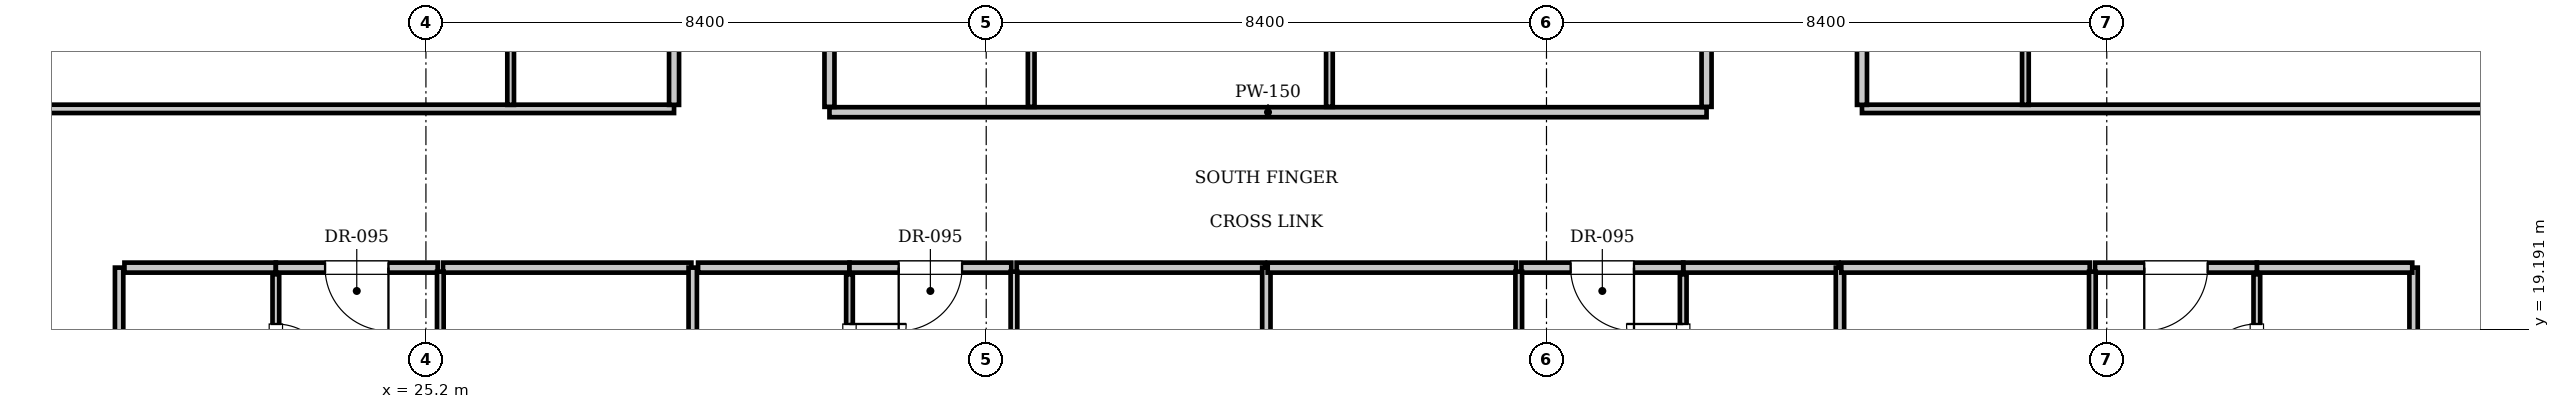
"""IFC4 building model, lengths in metres.
Left out: names, types, materials, properties, quantities, classifications, styles, units other than length and angle.
Written with IfcOpenShell. Run it as: python <this file> out.ifc"""

import sys

from ifc_helpers import new_model, si_unit, direction, frame, frame_2d, origin, place, context, subcontext, project, spatial, rectangle, extrude, element, fill, save


model = new_model("IFC4")
c1 = context("Model", 3, precision=1e-05, world=origin(), true_north=direction((0.0, 1.0)))
c2 = subcontext(c1, "Body", "Model", "MODEL_VIEW")
j1 = project(units=[si_unit("LENGTHUNIT", "METRE"), si_unit("PLANEANGLEUNIT", "RADIAN")], contexts=[c1])
p1 = place(None, origin())
s1 = spatial("IfcSite", under=j1, at=p1, CompositionType="ELEMENT")
p2 = place(p1, origin())
s2 = spatial("IfcBuilding", under=s1, at=p2, CompositionType="ELEMENT")
p3 = place(p2, frame((0.0, 0.0, 250.95)))
s3 = spatial("IfcBuildingStorey", under=s2, at=p3, CompositionType="ELEMENT", Elevation=250.95)
p4 = place(p3, frame((31.25, 22.45, 0.0), z_axis=(0.0, 0.0, 1.0), x_axis=(1.0, 0.0, 0.0)))
e1 = element("IfcWall", 1, at=p4, inside=s3, PredefinedType="PARTITIONING", context=c2, shape_type="SweptSolid", body=[
    extrude(rectangle(XDim=13.15, YDim=0.15, at=frame_2d((6.575, 0.0))), origin(), (0.0, 0.0, 1.0), 3.61),
])
for number, where, z_axis, x_axis in (
    (2, (31.25, 22.53, 0.0), (0.0, 0.0, 1.0), (0.0, 1.0, 0.0)),
    (3, (44.4, 22.53, 0.0), (0.0, 0.0, 1.0), (0.0, 1.0, 0.0)),
):
    element("IfcWall", number, at=place(p3, frame(where, z_axis=z_axis, x_axis=x_axis)), inside=s3, PredefinedType="PARTITIONING", context=c2, shape_type="SweptSolid", body=[
        extrude(rectangle(XDim=8.89, YDim=0.15, at=frame_2d((4.445, 0.0))), origin(), (0.0, 0.0, 1.0), 3.61),
    ])
for number, where, z_axis, x_axis in (
    (4, (34.274, 22.53, 0.0), (0.0, 0.0, 1.0), (0.0, 1.0, 0.0)),
    (5, (38.746, 22.53, 0.0), (0.0, 0.0, 1.0), (0.0, 1.0, 0.0)),
):
    element("IfcWall", number, at=place(p3, frame(where, z_axis=z_axis, x_axis=x_axis)), inside=s3, PredefinedType="PARTITIONING", context=c2, shape_type="SweptSolid", body=[
        extrude(rectangle(XDim=8.89, YDim=0.1, at=frame_2d((4.445, 0.0))), origin(), (0.0, 0.0, 1.0), 3.61),
    ])
for number, where, z_axis, x_axis in (
    (6, (20.6, 14.4, 0.0), (0.0, 0.0, 1.0), (0.0, 1.0, 0.0)),
    (7, (55.0, 14.4, 0.0), (0.0, 0.0, 1.0), (0.0, 1.0, 0.0)),
):
    element("IfcWall", number, at=place(p3, frame(where, z_axis=z_axis, x_axis=x_axis)), inside=s3, PredefinedType="PARTITIONING", context=c2, shape_type="SweptSolid", body=[
        extrude(rectangle(XDim=5.72, YDim=0.125, at=frame_2d((2.86, 0.0))), origin(), (0.0, 0.0, 1.0), 3.61),
    ])
p5 = place(p3, frame((20.68, 20.12, 0.0), z_axis=(0.0, 0.0, 1.0), x_axis=(1.0, 0.0, 0.0)))
e8 = element("IfcWall", 8, at=p5, inside=s3, PredefinedType="PARTITIONING", context=c2, shape_type="SweptSolid", body=[
    extrude(rectangle(XDim=2.27, YDim=0.15, at=frame_2d((1.135, 0.0))), origin(), (0.0, 0.0, 1.0), 3.61),
])
p6 = place(p3, frame((22.95, 17.68, 0.0), z_axis=(0.0, 0.0, 1.0), x_axis=(0.0, 1.0, 0.0)))
e9 = element("IfcWall", 9, at=p6, inside=s3, PredefinedType="PARTITIONING", context=c2, shape_type="SweptSolid", body=[
    extrude(rectangle(XDim=2.34, YDim=0.1, at=frame_2d((1.17, 0.0))), origin(), (0.0, 0.0, 1.0), 3.61),
])
p7 = place(p6, frame((0.745, 0.0, 0.0)))
e10 = element("IfcOpeningElement", 10, at=p7, cuts=e9, PredefinedType="OPENING", context=c2, shape_type="SweptSolid", body=[
    extrude(rectangle(XDim=0.85, YDim=2.1, at=frame_2d((0.425, 1.05))), frame((0.0, 0.06, 0.0), z_axis=(0.0, -1.0, 0.0), x_axis=(1.0, 0.0, 0.0)), (0.0, 0.0, 1.0), 0.12),
])
p8 = place(p3, frame((22.95, 20.12, 0.0), z_axis=(0.0, 0.0, 1.0), x_axis=(1.0, 0.0, 0.0)))
e11 = element("IfcWall", 11, at=p8, inside=s3, PredefinedType="PARTITIONING", context=c2, shape_type="SweptSolid", body=[
    extrude(rectangle(XDim=2.426, YDim=0.15, at=frame_2d((1.213, 0.0))), origin(), (0.0, 0.0, 1.0), 3.61),
])
p9 = place(p8, frame((0.738, 0.0, 0.0)))
e12 = element("IfcOpeningElement", 12, at=p9, cuts=e11, PredefinedType="OPENING", context=c2, shape_type="SweptSolid", body=[
    extrude(rectangle(XDim=0.95, YDim=2.15, at=frame_2d((0.475, 1.075))), frame((0.0, 0.085, 0.0), z_axis=(0.0, -1.0, 0.0), x_axis=(1.0, 0.0, 0.0)), (0.0, 0.0, 1.0), 0.17),
])
p10 = place(p3, frame((25.456, 20.12, 0.0), z_axis=(0.0, 0.0, 1.0), x_axis=(1.0, 0.0, 0.0)))
e13 = element("IfcWall", 13, at=p10, inside=s3, PredefinedType="PARTITIONING", context=c2, shape_type="SweptSolid", body=[
    extrude(rectangle(XDim=3.724, YDim=0.15, at=frame_2d((1.862, 0.0))), origin(), (0.0, 0.0, 1.0), 3.61),
])
p11 = place(p3, frame((25.416, 9.23, 0.0), z_axis=(0.0, 0.0, 1.0), x_axis=(0.0, 1.0, 0.0)))
e14 = element("IfcWall", 14, at=p11, inside=s3, PredefinedType="PARTITIONING", context=c2, shape_type="SweptSolid", body=[
    extrude(rectangle(XDim=10.83, YDim=0.1, at=frame_2d((5.415, 0.0))), origin(), (0.0, 0.0, 1.0), 3.61),
])
p12 = place(p11, frame((1.6, 0.0, 0.0)))
e15 = element("IfcOpeningElement", 15, at=p12, cuts=e14, PredefinedType="OPENING", context=c2, shape_type="SweptSolid", body=[
    extrude(rectangle(XDim=0.9, YDim=2.1, at=frame_2d((0.45, 1.05))), frame((0.0, 0.06, 0.0), z_axis=(0.0, -1.0, 0.0), x_axis=(1.0, 0.0, 0.0)), (0.0, 0.0, 1.0), 0.12),
])
p13 = place(p3, frame((29.2, 9.3, 0.0), z_axis=(0.0, 0.0, 1.0), x_axis=(0.0, 1.0, 0.0)))
e16 = element("IfcWall", 16, at=p13, inside=s3, PredefinedType="PARTITIONING", context=c2, shape_type="SweptSolid", body=[
    extrude(rectangle(XDim=10.82, YDim=0.125, at=frame_2d((5.41, 0.0))), origin(), (0.0, 0.0, 1.0), 3.61),
])
p14 = place(p3, frame((29.28, 20.12, 0.0), z_axis=(0.0, 0.0, 1.0), x_axis=(1.0, 0.0, 0.0)))
e17 = element("IfcWall", 17, at=p14, inside=s3, PredefinedType="PARTITIONING", context=c2, shape_type="SweptSolid", body=[
    extrude(rectangle(XDim=2.27, YDim=0.15, at=frame_2d((1.135, 0.0))), origin(), (0.0, 0.0, 1.0), 3.61),
])
p15 = place(p3, frame((31.55, 17.68, 0.0), z_axis=(0.0, 0.0, 1.0), x_axis=(0.0, 1.0, 0.0)))
e18 = element("IfcWall", 18, at=p15, inside=s3, PredefinedType="PARTITIONING", context=c2, shape_type="SweptSolid", body=[
    extrude(rectangle(XDim=2.34, YDim=0.1, at=frame_2d((1.17, 0.0))), origin(), (0.0, 0.0, 1.0), 3.61),
])
p16 = place(p15, frame((0.745, 0.0, 0.0)))
e19 = element("IfcOpeningElement", 19, at=p16, cuts=e18, PredefinedType="OPENING", context=c2, shape_type="SweptSolid", body=[
    extrude(rectangle(XDim=0.85, YDim=2.1, at=frame_2d((0.425, 1.05))), frame((0.0, 0.06, 0.0), z_axis=(0.0, -1.0, 0.0), x_axis=(1.0, 0.0, 0.0)), (0.0, 0.0, 1.0), 0.12),
])
p17 = place(p3, frame((31.55, 20.12, 0.0), z_axis=(0.0, 0.0, 1.0), x_axis=(1.0, 0.0, 0.0)))
e20 = element("IfcWall", 20, at=p17, inside=s3, PredefinedType="PARTITIONING", context=c2, shape_type="SweptSolid", body=[
    extrude(rectangle(XDim=2.426, YDim=0.15, at=frame_2d((1.213, 0.0))), origin(), (0.0, 0.0, 1.0), 3.61),
])
p18 = place(p17, frame((0.738, 0.0, 0.0)))
e21 = element("IfcOpeningElement", 21, at=p18, cuts=e20, PredefinedType="OPENING", context=c2, shape_type="SweptSolid", body=[
    extrude(rectangle(XDim=0.95, YDim=2.15, at=frame_2d((0.475, 1.075))), frame((0.0, 0.085, 0.0), z_axis=(0.0, -1.0, 0.0), x_axis=(1.0, 0.0, 0.0)), (0.0, 0.0, 1.0), 0.17),
])
p19 = place(p3, frame((34.056, 20.12, 0.0), z_axis=(0.0, 0.0, 1.0), x_axis=(1.0, 0.0, 0.0)))
e22 = element("IfcWall", 22, at=p19, inside=s3, PredefinedType="PARTITIONING", context=c2, shape_type="SweptSolid", body=[
    extrude(rectangle(XDim=3.724, YDim=0.15, at=frame_2d((1.862, 0.0))), origin(), (0.0, 0.0, 1.0), 3.61),
])
p20 = place(p3, frame((34.016, 9.23, 0.0), z_axis=(0.0, 0.0, 1.0), x_axis=(0.0, 1.0, 0.0)))
e23 = element("IfcWall", 23, at=p20, inside=s3, PredefinedType="PARTITIONING", context=c2, shape_type="SweptSolid", body=[
    extrude(rectangle(XDim=10.83, YDim=0.1, at=frame_2d((5.415, 0.0))), origin(), (0.0, 0.0, 1.0), 3.61),
])
p21 = place(p20, frame((1.6, 0.0, 0.0)))
e24 = element("IfcOpeningElement", 24, at=p21, cuts=e23, PredefinedType="OPENING", context=c2, shape_type="SweptSolid", body=[
    extrude(rectangle(XDim=0.9, YDim=2.1, at=frame_2d((0.45, 1.05))), frame((0.0, 0.06, 0.0), z_axis=(0.0, -1.0, 0.0), x_axis=(1.0, 0.0, 0.0)), (0.0, 0.0, 1.0), 0.12),
])
p22 = place(p3, frame((37.8, 9.3, 0.0), z_axis=(0.0, 0.0, 1.0), x_axis=(0.0, 1.0, 0.0)))
e25 = element("IfcWall", 25, at=p22, inside=s3, PredefinedType="PARTITIONING", context=c2, shape_type="SweptSolid", body=[
    extrude(rectangle(XDim=10.82, YDim=0.125, at=frame_2d((5.41, 0.0))), origin(), (0.0, 0.0, 1.0), 3.352),
])
p23 = place(p3, frame((44.05, 20.12, 0.0), z_axis=(0.0, 0.0, 1.0), x_axis=(1.0, 0.0, 0.0)))
e26 = element("IfcWall", 26, at=p23, inside=s3, PredefinedType="PARTITIONING", context=c2, shape_type="SweptSolid", body=[
    extrude(rectangle(XDim=2.33, YDim=0.15, at=frame_2d((1.165, 0.0))), origin(), (0.0, 0.0, 1.0), 3.61),
])
p24 = place(p3, frame((44.05, 17.68, 0.0), z_axis=(0.0, 0.0, 1.0), x_axis=(0.0, 1.0, 0.0)))
e27 = element("IfcWall", 27, at=p24, inside=s3, PredefinedType="PARTITIONING", context=c2, shape_type="SweptSolid", body=[
    extrude(rectangle(XDim=2.34, YDim=0.1, at=frame_2d((1.17, 0.0))), origin(), (0.0, 0.0, 1.0), 3.61),
])
p25 = place(p24, frame((0.745, 0.0, 0.0)))
e28 = element("IfcOpeningElement", 28, at=p25, cuts=e27, PredefinedType="OPENING", context=c2, shape_type="SweptSolid", body=[
    extrude(rectangle(XDim=0.85, YDim=2.1, at=frame_2d((0.425, 1.05))), frame((0.0, 0.06, 0.0), z_axis=(0.0, -1.0, 0.0), x_axis=(1.0, 0.0, 0.0)), (0.0, 0.0, 1.0), 0.12),
])
p26 = place(p3, frame((37.82, 20.12, 0.0), z_axis=(0.0, 0.0, 1.0), x_axis=(1.0, 0.0, 0.0)))
e29 = element("IfcWall", 29, at=p26, inside=s3, PredefinedType="PARTITIONING", context=c2, shape_type="SweptSolid", body=[
    extrude(rectangle(XDim=3.724, YDim=0.15, at=frame_2d((1.862, 0.0))), origin(), (0.0, 0.0, 1.0), 3.61),
])
p27 = place(p3, frame((41.624, 20.12, 0.0), z_axis=(0.0, 0.0, 1.0), x_axis=(1.0, 0.0, 0.0)))
e30 = element("IfcWall", 30, at=p27, inside=s3, PredefinedType="PARTITIONING", context=c2, shape_type="SweptSolid", body=[
    extrude(rectangle(XDim=2.426, YDim=0.15, at=frame_2d((1.213, 0.0))), origin(), (0.0, 0.0, 1.0), 3.61),
])
p28 = place(p27, frame((0.738, 0.0, 0.0)))
e31 = element("IfcOpeningElement", 31, at=p28, cuts=e30, PredefinedType="OPENING", context=c2, shape_type="SweptSolid", body=[
    extrude(rectangle(XDim=0.95, YDim=2.15, at=frame_2d((0.475, 1.075))), frame((0.0, 0.085, 0.0), z_axis=(0.0, -1.0, 0.0), x_axis=(1.0, 0.0, 0.0)), (0.0, 0.0, 1.0), 0.17),
])
p29 = place(p3, frame((41.584, 9.23, 0.0), z_axis=(0.0, 0.0, 1.0), x_axis=(0.0, 1.0, 0.0)))
e32 = element("IfcWall", 32, at=p29, inside=s3, PredefinedType="PARTITIONING", context=c2, shape_type="SweptSolid", body=[
    extrude(rectangle(XDim=10.83, YDim=0.1, at=frame_2d((5.415, 0.0))), origin(), (0.0, 0.0, 1.0), 3.61),
])
p30 = place(p29, frame((1.6, 0.0, 0.0)))
e33 = element("IfcOpeningElement", 33, at=p30, cuts=e32, PredefinedType="OPENING", context=c2, shape_type="SweptSolid", body=[
    extrude(rectangle(XDim=0.9, YDim=2.1, at=frame_2d((0.45, 1.05))), frame((0.0, 0.06, 0.0), z_axis=(0.0, -1.0, 0.0), x_axis=(1.0, 0.0, 0.0)), (0.0, 0.0, 1.0), 0.12),
])
p31 = place(p3, frame((46.4, 9.3, 0.0), z_axis=(0.0, 0.0, 1.0), x_axis=(0.0, 1.0, 0.0)))
e34 = element("IfcWall", 34, at=p31, inside=s3, PredefinedType="PARTITIONING", context=c2, shape_type="SweptSolid", body=[
    extrude(rectangle(XDim=10.82, YDim=0.125, at=frame_2d((5.41, 0.0))), origin(), (0.0, 0.0, 1.0), 3.61),
])
p32 = place(p3, frame((52.65, 20.12, 0.0), z_axis=(0.0, 0.0, 1.0), x_axis=(1.0, 0.0, 0.0)))
e35 = element("IfcWall", 35, at=p32, inside=s3, PredefinedType="PARTITIONING", context=c2, shape_type="SweptSolid", body=[
    extrude(rectangle(XDim=2.33, YDim=0.15, at=frame_2d((1.165, 0.0))), origin(), (0.0, 0.0, 1.0), 3.61),
])
p33 = place(p3, frame((52.65, 17.68, 0.0), z_axis=(0.0, 0.0, 1.0), x_axis=(0.0, 1.0, 0.0)))
e36 = element("IfcWall", 36, at=p33, inside=s3, PredefinedType="PARTITIONING", context=c2, shape_type="SweptSolid", body=[
    extrude(rectangle(XDim=2.34, YDim=0.1, at=frame_2d((1.17, 0.0))), origin(), (0.0, 0.0, 1.0), 3.61),
])
p34 = place(p33, frame((0.745, 0.0, 0.0)))
e37 = element("IfcOpeningElement", 37, at=p34, cuts=e36, PredefinedType="OPENING", context=c2, shape_type="SweptSolid", body=[
    extrude(rectangle(XDim=0.85, YDim=2.1, at=frame_2d((0.425, 1.05))), frame((0.0, 0.06, 0.0), z_axis=(0.0, -1.0, 0.0), x_axis=(1.0, 0.0, 0.0)), (0.0, 0.0, 1.0), 0.12),
])
p35 = place(p3, frame((46.42, 20.12, 0.0), z_axis=(0.0, 0.0, 1.0), x_axis=(1.0, 0.0, 0.0)))
e38 = element("IfcWall", 38, at=p35, inside=s3, PredefinedType="PARTITIONING", context=c2, shape_type="SweptSolid", body=[
    extrude(rectangle(XDim=3.724, YDim=0.15, at=frame_2d((1.862, 0.0))), origin(), (0.0, 0.0, 1.0), 3.61),
])
p36 = place(p3, frame((50.224, 20.12, 0.0), z_axis=(0.0, 0.0, 1.0), x_axis=(1.0, 0.0, 0.0)))
e39 = element("IfcWall", 39, at=p36, inside=s3, PredefinedType="PARTITIONING", context=c2, shape_type="SweptSolid", body=[
    extrude(rectangle(XDim=2.426, YDim=0.15, at=frame_2d((1.213, 0.0))), origin(), (0.0, 0.0, 1.0), 3.61),
])
p37 = place(p36, frame((0.738, 0.0, 0.0)))
e40 = element("IfcOpeningElement", 40, at=p37, cuts=e39, PredefinedType="OPENING", context=c2, shape_type="SweptSolid", body=[
    extrude(rectangle(XDim=0.95, YDim=2.15, at=frame_2d((0.475, 1.075))), frame((0.0, 0.085, 0.0), z_axis=(0.0, -1.0, 0.0), x_axis=(1.0, 0.0, 0.0)), (0.0, 0.0, 1.0), 0.17),
])
p38 = place(p3, frame((50.184, 9.23, 0.0), z_axis=(0.0, 0.0, 1.0), x_axis=(0.0, 1.0, 0.0)))
e41 = element("IfcWall", 41, at=p38, inside=s3, PredefinedType="PARTITIONING", context=c2, shape_type="SweptSolid", body=[
    extrude(rectangle(XDim=10.83, YDim=0.1, at=frame_2d((5.415, 0.0))), origin(), (0.0, 0.0, 1.0), 3.61),
])
p39 = place(p38, frame((1.6, 0.0, 0.0)))
e42 = element("IfcOpeningElement", 42, at=p39, cuts=e41, PredefinedType="OPENING", context=c2, shape_type="SweptSolid", body=[
    extrude(rectangle(XDim=0.9, YDim=2.1, at=frame_2d((0.45, 1.05))), frame((0.0, 0.06, 0.0), z_axis=(0.0, -1.0, 0.0), x_axis=(1.0, 0.0, 0.0)), (0.0, 0.0, 1.0), 0.12),
])
p40 = place(p3, frame((15.5, 22.5, 0.0), z_axis=(0.0, 0.0, 1.0), x_axis=(1.0, 0.0, 0.0)))
e43 = element("IfcWall", 43, at=p40, inside=s3, PredefinedType="PARTITIONING", context=c2, shape_type="SweptSolid", body=[
    extrude(rectangle(XDim=13.42, YDim=0.125, at=frame_2d((6.71, 0.0))), origin(), (0.0, 0.0, 1.0), 3.61),
])
p41 = place(p3, frame((46.73, 22.5, 0.0), z_axis=(0.0, 0.0, 1.0), x_axis=(1.0, 0.0, 0.0)))
e44 = element("IfcWall", 44, at=p41, inside=s3, PredefinedType="PARTITIONING", context=c2, shape_type="SweptSolid", body=[
    extrude(rectangle(XDim=13.37, YDim=0.125, at=frame_2d((6.685, 0.0))), origin(), (0.0, 0.0, 1.0), 3.61),
])
p42 = place(p3, frame((28.92, 22.56, 0.0), z_axis=(0.0, 0.0, 1.0), x_axis=(0.0, 1.0, 0.0)))
e45 = element("IfcWall", 45, at=p42, inside=s3, PredefinedType="PARTITIONING", context=c2, shape_type="SweptSolid", body=[
    extrude(rectangle(XDim=1.89, YDim=0.15, at=frame_2d((0.945, 0.0))), origin(), (0.0, 0.0, 1.0), 3.61),
])
p43 = place(p3, frame((26.47, 22.56, 0.0), z_axis=(0.0, 0.0, 1.0), x_axis=(0.0, 1.0, 0.0)))
e46 = element("IfcWall", 46, at=p43, inside=s3, PredefinedType="PARTITIONING", context=c2, shape_type="SweptSolid", body=[
    extrude(rectangle(XDim=1.89, YDim=0.1, at=frame_2d((0.945, 0.0))), origin(), (0.0, 0.0, 1.0), 3.61),
])
p44 = place(p3, frame((46.73, 22.56, 0.0), z_axis=(0.0, 0.0, 1.0), x_axis=(0.0, 1.0, 0.0)))
e47 = element("IfcWall", 47, at=p44, inside=s3, PredefinedType="PARTITIONING", context=c2, shape_type="SweptSolid", body=[
    extrude(rectangle(XDim=1.89, YDim=0.15, at=frame_2d((0.945, 0.0))), origin(), (0.0, 0.0, 1.0), 3.61),
])
p45 = place(p3, frame((49.18, 22.56, 0.0), z_axis=(0.0, 0.0, 1.0), x_axis=(0.0, 1.0, 0.0)))
e48 = element("IfcWall", 48, at=p45, inside=s3, PredefinedType="PARTITIONING", context=c2, shape_type="SweptSolid", body=[
    extrude(rectangle(XDim=1.89, YDim=0.1, at=frame_2d((0.945, 0.0))), origin(), (0.0, 0.0, 1.0), 3.61),
])
p46 = place(p7, frame((0.85, 0.0, 0.0), z_axis=(0.0, 0.0, 1.0), x_axis=(-1.0, 0.0, 0.0)))
e49 = element("IfcDoor", 49, at=p46, inside=s3, OperationType="SINGLE_SWING_RIGHT", PredefinedType="DOOR", context=c2, shape_type="SweptSolid", body=[
    extrude(rectangle(XDim=0.85, YDim=2.1, at=frame_2d((0.425, 1.05))), frame((0.0, 0.025, 0.0), z_axis=(0.0, -1.0, 0.0), x_axis=(1.0, 0.0, 0.0)), (0.0, 0.0, 1.0), 0.05),
])
fill(e10, e49)
p47 = place(p9, frame((0.95, 0.0, 0.0), z_axis=(0.0, 0.0, 1.0), x_axis=(-1.0, 0.0, 0.0)))
e50 = element("IfcDoor", 50, at=p47, inside=s3, OperationType="SINGLE_SWING_LEFT", PredefinedType="DOOR", context=c2, shape_type="SweptSolid", body=[
    extrude(rectangle(XDim=0.95, YDim=2.15, at=frame_2d((0.475, 1.075))), frame((0.0, 0.025, 0.0), z_axis=(0.0, -1.0, 0.0), x_axis=(1.0, 0.0, 0.0)), (0.0, 0.0, 1.0), 0.05),
])
fill(e12, e50)
p48 = place(p16, frame((0.85, 0.0, 0.0), z_axis=(0.0, 0.0, 1.0), x_axis=(-1.0, 0.0, 0.0)))
e51 = element("IfcDoor", 51, at=p48, inside=s3, OperationType="SINGLE_SWING_LEFT", PredefinedType="DOOR", context=c2, shape_type="SweptSolid", body=[
    extrude(rectangle(XDim=0.85, YDim=2.1, at=frame_2d((0.425, 1.05))), frame((0.0, 0.025, 0.0), z_axis=(0.0, -1.0, 0.0), x_axis=(1.0, 0.0, 0.0)), (0.0, 0.0, 1.0), 0.05),
])
fill(e19, e51)
p49 = place(p18, frame((0.95, 0.0, 0.0), z_axis=(0.0, 0.0, 1.0), x_axis=(-1.0, 0.0, 0.0)))
e52 = element("IfcDoor", 52, at=p49, inside=s3, OperationType="SINGLE_SWING_RIGHT", PredefinedType="DOOR", context=c2, shape_type="SweptSolid", body=[
    extrude(rectangle(XDim=0.95, YDim=2.15, at=frame_2d((0.475, 1.075))), frame((0.0, 0.025, 0.0), z_axis=(0.0, -1.0, 0.0), x_axis=(1.0, 0.0, 0.0)), (0.0, 0.0, 1.0), 0.05),
])
fill(e21, e52)
p50 = place(p25, origin())
e53 = element("IfcDoor", 53, at=p50, inside=s3, OperationType="SINGLE_SWING_RIGHT", PredefinedType="DOOR", context=c2, shape_type="SweptSolid", body=[
    extrude(rectangle(XDim=0.85, YDim=2.1, at=frame_2d((0.425, 1.05))), frame((0.0, 0.025, 0.0), z_axis=(0.0, -1.0, 0.0), x_axis=(1.0, 0.0, 0.0)), (0.0, 0.0, 1.0), 0.05),
])
fill(e28, e53)
p51 = place(p28, frame((0.95, 0.0, 0.0), z_axis=(0.0, 0.0, 1.0), x_axis=(-1.0, 0.0, 0.0)))
e54 = element("IfcDoor", 54, at=p51, inside=s3, OperationType="SINGLE_SWING_LEFT", PredefinedType="DOOR", context=c2, shape_type="SweptSolid", body=[
    extrude(rectangle(XDim=0.95, YDim=2.15, at=frame_2d((0.475, 1.075))), frame((0.0, 0.025, 0.0), z_axis=(0.0, -1.0, 0.0), x_axis=(1.0, 0.0, 0.0)), (0.0, 0.0, 1.0), 0.05),
])
fill(e31, e54)
p52 = place(p34, origin())
e55 = element("IfcDoor", 55, at=p52, inside=s3, OperationType="SINGLE_SWING_LEFT", PredefinedType="DOOR", context=c2, shape_type="SweptSolid", body=[
    extrude(rectangle(XDim=0.85, YDim=2.1, at=frame_2d((0.425, 1.05))), frame((0.0, 0.025, 0.0), z_axis=(0.0, -1.0, 0.0), x_axis=(1.0, 0.0, 0.0)), (0.0, 0.0, 1.0), 0.05),
])
fill(e37, e55)
p53 = place(p37, frame((0.95, 0.0, 0.0), z_axis=(0.0, 0.0, 1.0), x_axis=(-1.0, 0.0, 0.0)))
e56 = element("IfcDoor", 56, at=p53, inside=s3, OperationType="SINGLE_SWING_RIGHT", PredefinedType="DOOR", context=c2, shape_type="SweptSolid", body=[
    extrude(rectangle(XDim=0.95, YDim=2.15, at=frame_2d((0.475, 1.075))), frame((0.0, 0.025, 0.0), z_axis=(0.0, -1.0, 0.0), x_axis=(1.0, 0.0, 0.0)), (0.0, 0.0, 1.0), 0.05),
])
fill(e40, e56)
save(model, sys.argv[1])
